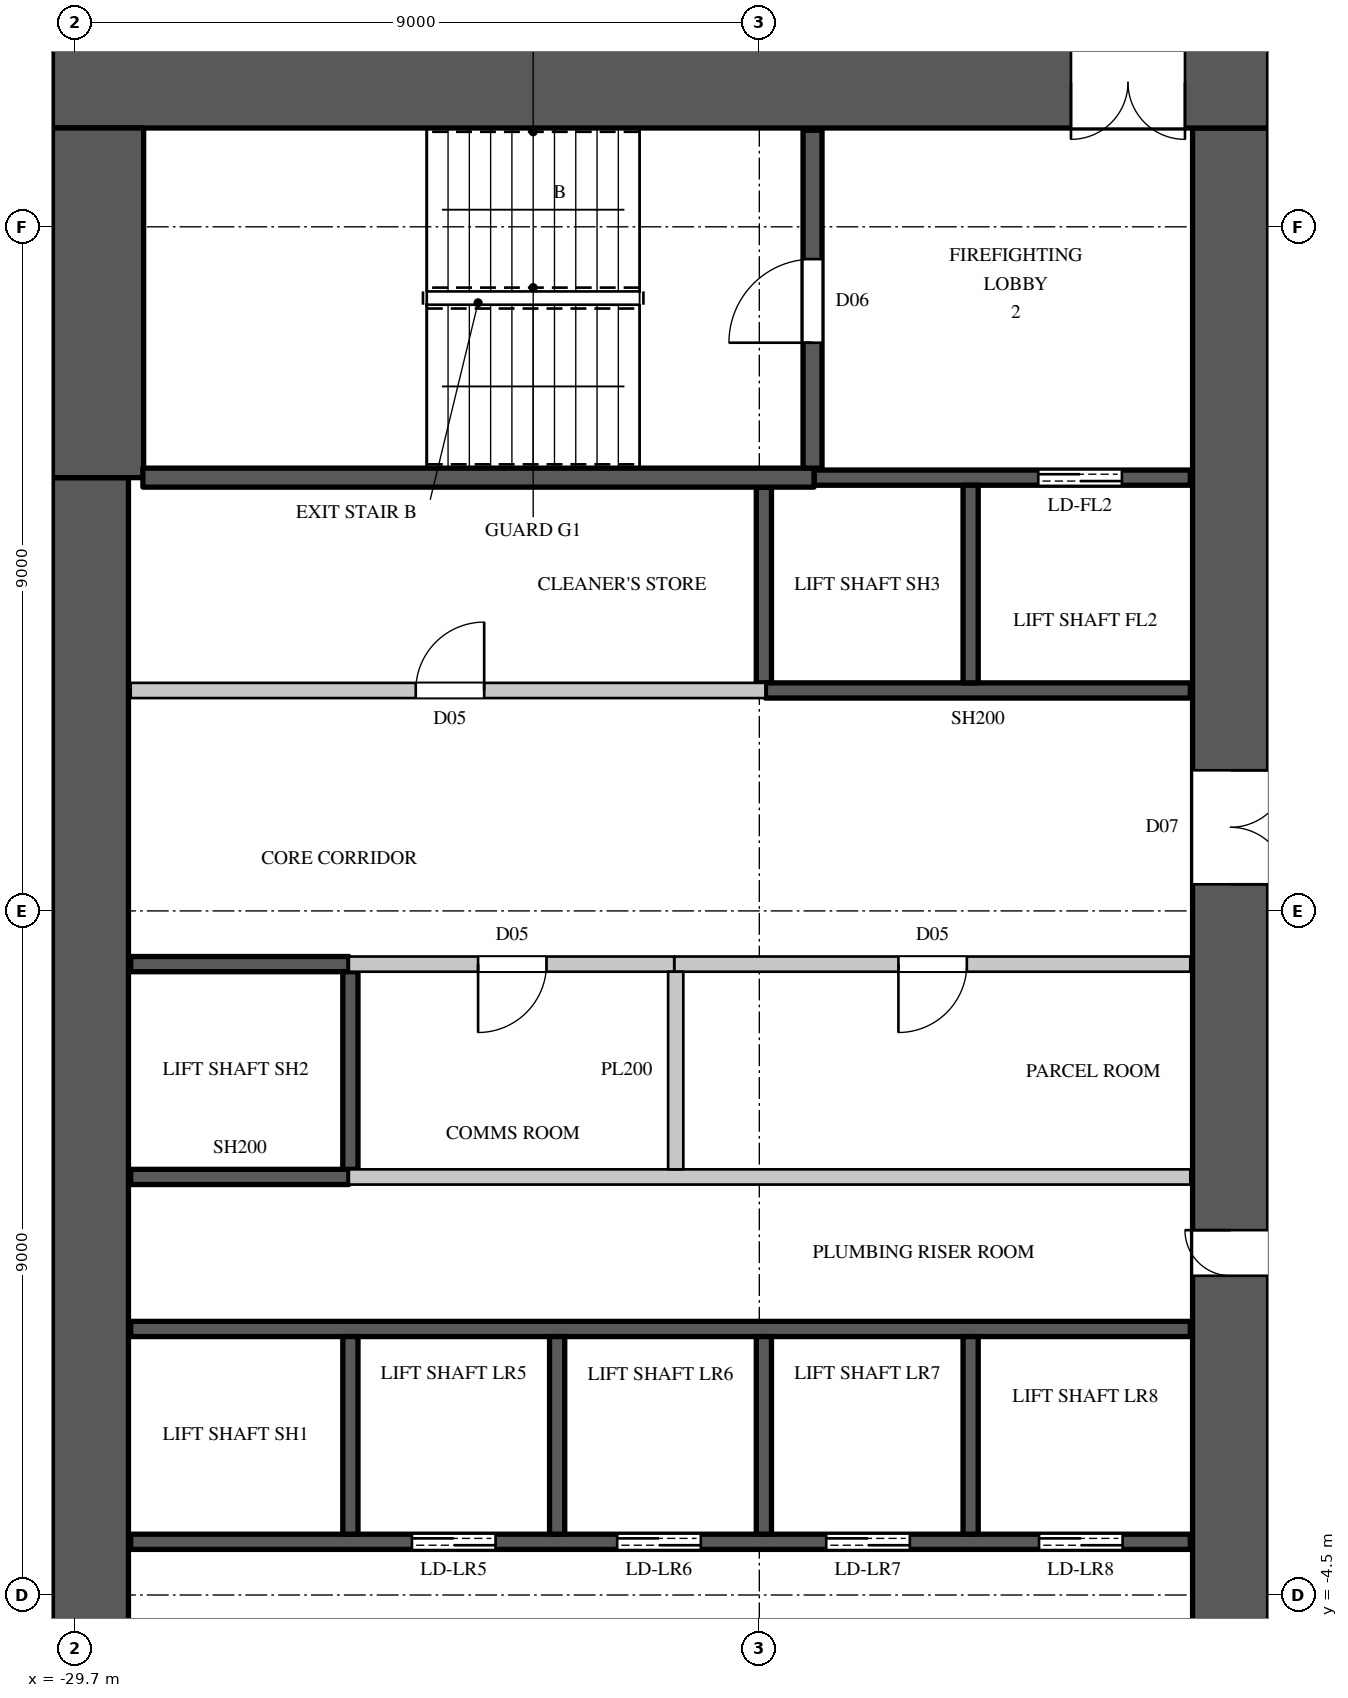
"""IFC4 building model, lengths in metres.
Left out: names, types, materials, properties, quantities, classifications, styles, units other than length and angle.
Written with IfcOpenShell. Run it as: python <this file> out.ifc"""

import sys

from ifc_helpers import new_model, si_unit, direction, frame, frame_2d, origin, place, context, subcontext, project, spatial, rectangle, extrude, element, fill, save


model = new_model("IFC4")
c1 = context("Model", 3, precision=1e-05, world=origin(), true_north=direction((0.0, 1.0)))
c2 = subcontext(c1, "Body", "Model", "MODEL_VIEW")
j1 = project(units=[si_unit("LENGTHUNIT", "METRE"), si_unit("PLANEANGLEUNIT", "RADIAN")], contexts=[c1])
p1 = place(None, origin())
s1 = spatial("IfcSite", under=j1, at=p1, CompositionType="ELEMENT")
p2 = place(p1, origin())
s2 = spatial("IfcBuilding", under=s1, at=p2, CompositionType="ELEMENT")
p3 = place(p2, frame((0.0, 0.0, 98.7)))
s3 = spatial("IfcBuildingStorey", under=s2, at=p3, CompositionType="ELEMENT", Elevation=98.7)
p4 = place(p3, frame((-30.0, 15.4, 0.0), z_axis=(0.0, 0.0, 1.0), x_axis=(1.0, 0.0, 0.0)))
e1 = element("IfcWall", 1, at=p4, inside=s3, PredefinedType="SHEAR", context=c2, shape_type="SweptSolid", body=[
    extrude(rectangle(XDim=16.0, YDim=1.2, at=frame_2d((8.0, 0.0))), origin(), (0.0, 0.0, 1.0), 3.6),
])
p5 = place(p4, frame((13.4, 0.0, 0.0)))
e2 = element("IfcOpeningElement", 2, at=p5, cuts=e1, PredefinedType="OPENING", context=c2, shape_type="SweptSolid", body=[
    extrude(rectangle(XDim=1.5, YDim=2.4, at=frame_2d((0.75, 1.2))), frame((0.0, 0.61, 0.0), z_axis=(0.0, -1.0, 0.0), x_axis=(1.0, 0.0, 0.0)), (0.0, 0.0, 1.0), 1.22),
])
p6 = place(p3, frame((-14.5, -14.8, 0.0), z_axis=(0.0, 0.0, 1.0), x_axis=(0.0, 1.0, 0.0)))
e3 = element("IfcWall", 3, at=p6, inside=s3, PredefinedType="SHEAR", context=c2, shape_type="SweptSolid", body=[
    extrude(rectangle(XDim=29.6, YDim=1.0, at=frame_2d((14.8, 0.0))), origin(), (0.0, 0.0, 1.0), 3.6),
])
p7 = place(p6, frame((8.45, 0.0, 0.0)))
e4 = element("IfcOpeningElement", 4, at=p7, cuts=e3, PredefinedType="OPENING", context=c2, shape_type="SweptSolid", body=[
    extrude(rectangle(XDim=1.5, YDim=2.4, at=frame_2d((0.75, 1.2))), frame((0.0, 0.51, 0.0), z_axis=(0.0, -1.0, 0.0), x_axis=(1.0, 0.0, 0.0)), (0.0, 0.0, 1.0), 1.02),
])
p8 = place(p6, frame((19.65, 0.0, 0.0)))
e5 = element("IfcOpeningElement", 5, at=p8, cuts=e3, PredefinedType="OPENING", context=c2, shape_type="SweptSolid", body=[
    extrude(rectangle(XDim=1.5, YDim=2.4, at=frame_2d((0.75, 1.2))), frame((0.0, 0.51, 0.0), z_axis=(0.0, -1.0, 0.0), x_axis=(1.0, 0.0, 0.0)), (0.0, 0.0, 1.0), 1.02),
])
p9 = place(p6, frame((14.5, 0.0, 0.0)))
e6 = element("IfcOpeningElement", 6, at=p9, cuts=e3, PredefinedType="OPENING", context=c2, shape_type="SweptSolid", body=[
    extrude(rectangle(XDim=0.6, YDim=2.0, at=frame_2d((0.3, 1.0))), frame((0.0, 0.51, 0.0), z_axis=(0.0, -1.0, 0.0), x_axis=(1.0, 0.0, 0.0)), (0.0, 0.0, 1.0), 1.02),
])
p10 = place(p3, frame((-29.5, -10.2, 0.0), z_axis=(0.0, 0.0, 1.0), x_axis=(0.0, 1.0, 0.0)))
e7 = element("IfcWall", 7, at=p10, inside=s3, PredefinedType="SHEAR", context=c2, shape_type="SweptSolid", body=[
    extrude(rectangle(XDim=20.4, YDim=1.0, at=frame_2d((10.2, 0.0))), origin(), (0.0, 0.0, 1.0), 3.6),
])
p11 = place(p3, frame((-29.4, 10.2, 0.0), z_axis=(0.0, 0.0, 1.0), x_axis=(0.0, 1.0, 0.0)))
e8 = element("IfcWall", 8, at=p11, inside=s3, PredefinedType="SHEAR", context=c2, shape_type="SweptSolid", body=[
    extrude(rectangle(XDim=4.6, YDim=1.2, at=frame_2d((2.3, 0.0))), origin(), (0.0, 0.0, 1.0), 3.6),
])
p12 = place(p3, frame((-28.97, 7.4, 0.0), z_axis=(0.0, 0.0, 1.0), x_axis=(1.0, 0.0, 0.0)))
e9 = element("IfcWall", 9, at=p12, inside=s3, PredefinedType="PARTITIONING", context=c2, shape_type="SweptSolid", body=[
    extrude(rectangle(XDim=8.35, YDim=0.2, at=frame_2d((4.175, 0.0))), origin(), (0.0, 0.0, 1.0), 3.3),
])
p13 = place(p12, frame((3.75, 0.0, 0.0)))
e10 = element("IfcOpeningElement", 10, at=p13, cuts=e9, PredefinedType="OPENING", context=c2, shape_type="SweptSolid", body=[
    extrude(rectangle(XDim=0.9, YDim=2.2, at=frame_2d((0.45, 1.1))), frame((0.0, 0.11, 0.0), z_axis=(0.0, -1.0, 0.0), x_axis=(1.0, 0.0, 0.0)), (0.0, 0.0, 1.0), 0.22),
])
p14 = place(p3, frame((-21.82, 3.8, 0.0), z_axis=(0.0, 0.0, 1.0), x_axis=(1.0, 0.0, 0.0)))
e11 = element("IfcWall", 11, at=p14, inside=s3, PredefinedType="PARTITIONING", context=c2, shape_type="SweptSolid", body=[
    extrude(rectangle(XDim=6.79, YDim=0.2, at=frame_2d((3.395, 0.0))), origin(), (0.0, 0.0, 1.0), 3.3),
])
p15 = place(p14, frame((2.95, 0.0, 0.0)))
e12 = element("IfcOpeningElement", 12, at=p15, cuts=e11, PredefinedType="OPENING", context=c2, shape_type="SweptSolid", body=[
    extrude(rectangle(XDim=0.9, YDim=2.2, at=frame_2d((0.45, 1.1))), frame((0.0, 0.11, 0.0), z_axis=(0.0, -1.0, 0.0), x_axis=(1.0, 0.0, 0.0)), (0.0, 0.0, 1.0), 0.22),
])
p16 = place(p3, frame((-26.1, 1.0, 0.0), z_axis=(0.0, 0.0, 1.0), x_axis=(1.0, 0.0, 0.0)))
e13 = element("IfcWall", 13, at=p16, inside=s3, PredefinedType="PARTITIONING", context=c2, shape_type="SweptSolid", body=[
    extrude(rectangle(XDim=11.07, YDim=0.2, at=frame_2d((5.535, 0.0))), origin(), (0.0, 0.0, 1.0), 3.3),
])
p17 = place(p3, frame((-26.1, 3.8, 0.0), z_axis=(0.0, 0.0, 1.0), x_axis=(1.0, 0.0, 0.0)))
e14 = element("IfcWall", 14, at=p17, inside=s3, PredefinedType="PARTITIONING", context=c2, shape_type="SweptSolid", body=[
    extrude(rectangle(XDim=4.28, YDim=0.2, at=frame_2d((2.14, 0.0))), origin(), (0.0, 0.0, 1.0), 3.3),
])
p18 = place(p17, frame((1.7, 0.0, 0.0)))
e15 = element("IfcOpeningElement", 15, at=p18, cuts=e14, PredefinedType="OPENING", context=c2, shape_type="SweptSolid", body=[
    extrude(rectangle(XDim=0.9, YDim=2.2, at=frame_2d((0.45, 1.1))), frame((0.0, 0.11, 0.0), z_axis=(0.0, -1.0, 0.0), x_axis=(1.0, 0.0, 0.0)), (0.0, 0.0, 1.0), 0.22),
])
p19 = place(p3, frame((-21.8, 1.1, 0.0), z_axis=(0.0, 0.0, 1.0), x_axis=(0.0, 1.0, 0.0)))
e16 = element("IfcWall", 16, at=p19, inside=s3, PredefinedType="PARTITIONING", context=c2, shape_type="SweptSolid", body=[
    extrude(rectangle(XDim=2.6, YDim=0.2, at=frame_2d((1.3, 0.0))), origin(), (0.0, 0.0, 1.0), 3.3),
])
p20 = place(p3, frame((-28.97, -3.8, 0.0), z_axis=(0.0, 0.0, 1.0), x_axis=(1.0, 0.0, 0.0)))
e17 = element("IfcWall", 17, at=p20, inside=s3, PredefinedType="SHEAR", context=c2, shape_type="SweptSolid", body=[
    extrude(rectangle(XDim=13.94, YDim=0.2, at=frame_2d((6.97, 0.0))), origin(), (0.0, 0.0, 1.0), 3.3),
])
p21 = place(p20, frame((3.7, 0.0, 0.0)))
e18 = element("IfcOpeningElement", 18, at=p21, cuts=e17, PredefinedType="OPENING", context=c2, shape_type="SweptSolid", body=[
    extrude(rectangle(XDim=1.1, YDim=2.2, at=frame_2d((0.55, 1.1))), frame((0.0, 0.11, 0.0), z_axis=(0.0, -1.0, 0.0), x_axis=(1.0, 0.0, 0.0)), (0.0, 0.0, 1.0), 0.22),
])
p22 = place(p20, frame((6.4, 0.0, 0.0)))
e19 = element("IfcOpeningElement", 19, at=p22, cuts=e17, PredefinedType="OPENING", context=c2, shape_type="SweptSolid", body=[
    extrude(rectangle(XDim=1.1, YDim=2.2, at=frame_2d((0.55, 1.1))), frame((0.0, 0.11, 0.0), z_axis=(0.0, -1.0, 0.0), x_axis=(1.0, 0.0, 0.0)), (0.0, 0.0, 1.0), 0.22),
])
p23 = place(p20, frame((9.15, 0.0, 0.0)))
e20 = element("IfcOpeningElement", 20, at=p23, cuts=e17, PredefinedType="OPENING", context=c2, shape_type="SweptSolid", body=[
    extrude(rectangle(XDim=1.1, YDim=2.2, at=frame_2d((0.55, 1.1))), frame((0.0, 0.11, 0.0), z_axis=(0.0, -1.0, 0.0), x_axis=(1.0, 0.0, 0.0)), (0.0, 0.0, 1.0), 0.22),
])
p24 = place(p20, frame((11.95, 0.0, 0.0)))
e21 = element("IfcOpeningElement", 21, at=p24, cuts=e17, PredefinedType="OPENING", context=c2, shape_type="SweptSolid", body=[
    extrude(rectangle(XDim=1.1, YDim=2.2, at=frame_2d((0.55, 1.1))), frame((0.0, 0.11, 0.0), z_axis=(0.0, -1.0, 0.0), x_axis=(1.0, 0.0, 0.0)), (0.0, 0.0, 1.0), 0.22),
])
p25 = place(p3, frame((-28.97, -1.0, 0.0), z_axis=(0.0, 0.0, 1.0), x_axis=(1.0, 0.0, 0.0)))
e22 = element("IfcWall", 22, at=p25, inside=s3, PredefinedType="SHEAR", context=c2, shape_type="SweptSolid", body=[
    extrude(rectangle(XDim=13.94, YDim=0.2, at=frame_2d((6.97, 0.0))), origin(), (0.0, 0.0, 1.0), 3.3),
])
for number, where, z_axis, x_axis in (
    (23, (-28.97, 1.0, 0.0), (0.0, 0.0, 1.0), (1.0, 0.0, 0.0)),
    (24, (-28.97, 3.8, 0.0), (0.0, 0.0, 1.0), (1.0, 0.0, 0.0)),
):
    element("IfcWall", number, at=place(p3, frame(where, z_axis=z_axis, x_axis=x_axis)), inside=s3, PredefinedType="SHEAR", context=c2, shape_type="SweptSolid", body=[
        extrude(rectangle(XDim=2.87, YDim=0.2, at=frame_2d((1.435, 0.0))), origin(), (0.0, 0.0, 1.0), 3.3),
    ])
p26 = place(p3, frame((-26.08, -3.7, 0.0), z_axis=(0.0, 0.0, 1.0), x_axis=(0.0, 1.0, 0.0)))
e25 = element("IfcWall", 25, at=p26, inside=s3, PredefinedType="SHEAR", context=c2, shape_type="SweptSolid", body=[
    extrude(rectangle(XDim=2.6, YDim=0.2, at=frame_2d((1.3, 0.0))), origin(), (0.0, 0.0, 1.0), 3.6),
])
p27 = place(p3, frame((-26.08, 1.1, 0.0), z_axis=(0.0, 0.0, 1.0), x_axis=(0.0, 1.0, 0.0)))
e26 = element("IfcWall", 26, at=p27, inside=s3, PredefinedType="SHEAR", context=c2, shape_type="SweptSolid", body=[
    extrude(rectangle(XDim=2.6, YDim=0.2, at=frame_2d((1.3, 0.0))), origin(), (0.0, 0.0, 1.0), 3.3),
])
for number, where, z_axis, x_axis in (
    (27, (-23.36, -3.7, 0.0), (0.0, 0.0, 1.0), (0.0, 1.0, 0.0)),
    (28, (-20.64, -3.7, 0.0), (0.0, 0.0, 1.0), (0.0, 1.0, 0.0)),
):
    element("IfcWall", number, at=place(p3, frame(where, z_axis=z_axis, x_axis=x_axis)), inside=s3, PredefinedType="SHEAR", context=c2, shape_type="SweptSolid", body=[
        extrude(rectangle(XDim=2.6, YDim=0.2, at=frame_2d((1.3, 0.0))), origin(), (0.0, 0.0, 1.0), 3.6),
    ])
p28 = place(p3, frame((-20.64, 7.5, 0.0), z_axis=(0.0, 0.0, 1.0), x_axis=(0.0, 1.0, 0.0)))
e29 = element("IfcWall", 29, at=p28, inside=s3, PredefinedType="SHEAR", context=c2, shape_type="SweptSolid", body=[
    extrude(rectangle(XDim=2.575, YDim=0.2, at=frame_2d((1.288, 0.0))), origin(), (0.0, 0.0, 1.0), 3.3),
])
p29 = place(p3, frame((-20.62, 7.4, 0.0), z_axis=(0.0, 0.0, 1.0), x_axis=(1.0, 0.0, 0.0)))
e30 = element("IfcWall", 30, at=p29, inside=s3, PredefinedType="SHEAR", context=c2, shape_type="SweptSolid", body=[
    extrude(rectangle(XDim=5.59, YDim=0.2, at=frame_2d((2.795, 0.0))), origin(), (0.0, 0.0, 1.0), 3.3),
])
p30 = place(p3, frame((-19.98, 10.2, 0.0), z_axis=(0.0, 0.0, 1.0), x_axis=(1.0, 0.0, 0.0)))
e31 = element("IfcWall", 31, at=p30, inside=s3, PredefinedType="SHEAR", context=c2, shape_type="SweptSolid", body=[
    extrude(rectangle(XDim=4.95, YDim=0.2, at=frame_2d((2.475, 0.0))), origin(), (0.0, 0.0, 1.0), 3.3),
])
p31 = place(p30, frame((2.95, 0.0, 0.0)))
e32 = element("IfcOpeningElement", 32, at=p31, cuts=e31, PredefinedType="OPENING", context=c2, shape_type="SweptSolid", body=[
    extrude(rectangle(XDim=1.1, YDim=2.2, at=frame_2d((0.55, 1.1))), frame((0.0, 0.11, 0.0), z_axis=(0.0, -1.0, 0.0), x_axis=(1.0, 0.0, 0.0)), (0.0, 0.0, 1.0), 0.22),
])
p32 = place(p3, frame((-17.92, -3.7, 0.0), z_axis=(0.0, 0.0, 1.0), x_axis=(0.0, 1.0, 0.0)))
e33 = element("IfcWall", 33, at=p32, inside=s3, PredefinedType="SHEAR", context=c2, shape_type="SweptSolid", body=[
    extrude(rectangle(XDim=2.6, YDim=0.2, at=frame_2d((1.3, 0.0))), origin(), (0.0, 0.0, 1.0), 3.6),
])
p33 = place(p3, frame((-17.92, 7.5, 0.0), z_axis=(0.0, 0.0, 1.0), x_axis=(0.0, 1.0, 0.0)))
e34 = element("IfcWall", 34, at=p33, inside=s3, PredefinedType="SHEAR", context=c2, shape_type="SweptSolid", body=[
    extrude(rectangle(XDim=2.6, YDim=0.2, at=frame_2d((1.3, 0.0))), origin(), (0.0, 0.0, 1.0), 3.6),
])
p34 = place(p3, frame((-28.81, 10.2, 0.0), z_axis=(0.0, 0.0, 1.0), x_axis=(1.0, 0.0, 0.0)))
e35 = element("IfcWall", 35, at=p34, inside=s3, PredefinedType="SHEAR", context=c2, shape_type="SweptSolid", body=[
    extrude(rectangle(XDim=8.83, YDim=0.25, at=frame_2d((4.415, 0.0))), origin(), (0.0, 0.0, 1.0), 3.3),
])
p35 = place(p3, frame((-20.0, 10.325, 0.0), z_axis=(0.0, 0.0, 1.0), x_axis=(0.0, 1.0, 0.0)))
e36 = element("IfcWall", 36, at=p35, inside=s3, PredefinedType="SHEAR", context=c2, shape_type="SweptSolid", body=[
    extrude(rectangle(XDim=4.445, YDim=0.25, at=frame_2d((2.223, 0.0))), origin(), (0.0, 0.0, 1.0), 3.3),
])
p36 = place(p35, frame((1.65, 0.0, 0.0)))
e37 = element("IfcOpeningElement", 37, at=p36, cuts=e36, PredefinedType="OPENING", context=c2, shape_type="SweptSolid", body=[
    extrude(rectangle(XDim=1.1, YDim=2.2, at=frame_2d((0.55, 1.1))), frame((0.0, 0.135, 0.0), z_axis=(0.0, -1.0, 0.0), x_axis=(1.0, 0.0, 0.0)), (0.0, 0.0, 1.0), 0.27),
])
p37 = place(p36, origin())
e38 = element("IfcDoor", 38, at=p37, inside=s3, OperationType="SINGLE_SWING_LEFT", PredefinedType="DOOR", context=c2, shape_type="SweptSolid", body=[
    extrude(rectangle(XDim=1.1, YDim=2.2, at=frame_2d((0.55, 1.1))), frame((0.0, 0.025, 0.0), z_axis=(0.0, -1.0, 0.0), x_axis=(1.0, 0.0, 0.0)), (0.0, 0.0, 1.0), 0.05),
])
fill(e37, e38)
p38 = place(p18, origin())
e39 = element("IfcDoor", 39, at=p38, inside=s3, OperationType="SINGLE_SWING_RIGHT", PredefinedType="DOOR", context=c2, shape_type="SweptSolid", body=[
    extrude(rectangle(XDim=0.9, YDim=2.2, at=frame_2d((0.45, 1.1))), frame((0.0, 0.025, 0.0), z_axis=(0.0, -1.0, 0.0), x_axis=(1.0, 0.0, 0.0)), (0.0, 0.0, 1.0), 0.05),
])
fill(e15, e39)
p39 = place(p15, origin())
e40 = element("IfcDoor", 40, at=p39, inside=s3, OperationType="SINGLE_SWING_RIGHT", PredefinedType="DOOR", context=c2, shape_type="SweptSolid", body=[
    extrude(rectangle(XDim=0.9, YDim=2.2, at=frame_2d((0.45, 1.1))), frame((0.0, 0.025, 0.0), z_axis=(0.0, -1.0, 0.0), x_axis=(1.0, 0.0, 0.0)), (0.0, 0.0, 1.0), 0.05),
])
fill(e12, e40)
p40 = place(p13, origin())
e41 = element("IfcDoor", 41, at=p40, inside=s3, OperationType="SINGLE_SWING_RIGHT", PredefinedType="DOOR", context=c2, shape_type="SweptSolid", body=[
    extrude(rectangle(XDim=0.9, YDim=2.2, at=frame_2d((0.45, 1.1))), frame((0.0, 0.025, 0.0), z_axis=(0.0, -1.0, 0.0), x_axis=(1.0, 0.0, 0.0)), (0.0, 0.0, 1.0), 0.05),
])
fill(e10, e41)
p41 = place(p21, origin())
e42 = element("IfcDoor", 42, at=p41, inside=s3, OperationType="DOUBLE_DOOR_SLIDING", PredefinedType="DOOR", context=c2, shape_type="SweptSolid", body=[
    extrude(rectangle(XDim=1.1, YDim=2.2, at=frame_2d((0.55, 1.1))), frame((0.0, 0.025, 0.0), z_axis=(0.0, -1.0, 0.0), x_axis=(1.0, 0.0, 0.0)), (0.0, 0.0, 1.0), 0.05),
])
fill(e18, e42)
p42 = place(p22, origin())
e43 = element("IfcDoor", 43, at=p42, inside=s3, OperationType="DOUBLE_DOOR_SLIDING", PredefinedType="DOOR", context=c2, shape_type="SweptSolid", body=[
    extrude(rectangle(XDim=1.1, YDim=2.2, at=frame_2d((0.55, 1.1))), frame((0.0, 0.025, 0.0), z_axis=(0.0, -1.0, 0.0), x_axis=(1.0, 0.0, 0.0)), (0.0, 0.0, 1.0), 0.05),
])
fill(e19, e43)
p43 = place(p23, origin())
e44 = element("IfcDoor", 44, at=p43, inside=s3, OperationType="DOUBLE_DOOR_SLIDING", PredefinedType="DOOR", context=c2, shape_type="SweptSolid", body=[
    extrude(rectangle(XDim=1.1, YDim=2.2, at=frame_2d((0.55, 1.1))), frame((0.0, 0.025, 0.0), z_axis=(0.0, -1.0, 0.0), x_axis=(1.0, 0.0, 0.0)), (0.0, 0.0, 1.0), 0.05),
])
fill(e20, e44)
p44 = place(p24, origin())
e45 = element("IfcDoor", 45, at=p44, inside=s3, OperationType="DOUBLE_DOOR_SLIDING", PredefinedType="DOOR", context=c2, shape_type="SweptSolid", body=[
    extrude(rectangle(XDim=1.1, YDim=2.2, at=frame_2d((0.55, 1.1))), frame((0.0, 0.025, 0.0), z_axis=(0.0, -1.0, 0.0), x_axis=(1.0, 0.0, 0.0)), (0.0, 0.0, 1.0), 0.05),
])
fill(e21, e45)
p45 = place(p31, origin())
e46 = element("IfcDoor", 46, at=p45, inside=s3, OperationType="DOUBLE_DOOR_SLIDING", PredefinedType="DOOR", context=c2, shape_type="SweptSolid", body=[
    extrude(rectangle(XDim=1.1, YDim=2.2, at=frame_2d((0.55, 1.1))), frame((0.0, 0.025, 0.0), z_axis=(0.0, -1.0, 0.0), x_axis=(1.0, 0.0, 0.0)), (0.0, 0.0, 1.0), 0.05),
])
fill(e32, e46)
p46 = place(p5, origin())
e47 = element("IfcDoor", 47, at=p46, inside=s3, OperationType="DOUBLE_DOOR_SINGLE_SWING", PredefinedType="DOOR", context=c2, shape_type="SweptSolid", body=[
    extrude(rectangle(XDim=1.5, YDim=2.4, at=frame_2d((0.75, 1.2))), frame((0.0, 0.025, 0.0), z_axis=(0.0, -1.0, 0.0), x_axis=(1.0, 0.0, 0.0)), (0.0, 0.0, 1.0), 0.05),
])
fill(e2, e47)
p47 = place(p8, origin())
e48 = element("IfcDoor", 48, at=p47, inside=s3, OperationType="DOUBLE_DOOR_SINGLE_SWING", PredefinedType="DOOR", context=c2, shape_type="SweptSolid", body=[
    extrude(rectangle(XDim=1.5, YDim=2.4, at=frame_2d((0.75, 1.2))), frame((0.0, -0.445, 0.0), z_axis=(0.0, -1.0, 0.0), x_axis=(1.0, 0.0, 0.0)), (0.0, 0.0, 1.0), 0.05),
])
fill(e5, e48)
p48 = place(p9, origin())
e49 = element("IfcDoor", 49, at=p48, inside=s3, OperationType="SINGLE_SWING_RIGHT", PredefinedType="DOOR", context=c2, shape_type="SweptSolid", body=[
    extrude(rectangle(XDim=0.6, YDim=2.0, at=frame_2d((0.3, 1.0))), frame((0.0, 0.495, 0.0), z_axis=(0.0, -1.0, 0.0), x_axis=(1.0, 0.0, 0.0)), (0.0, 0.0, 1.0), 0.05),
])
fill(e6, e49)
save(model, sys.argv[1])
